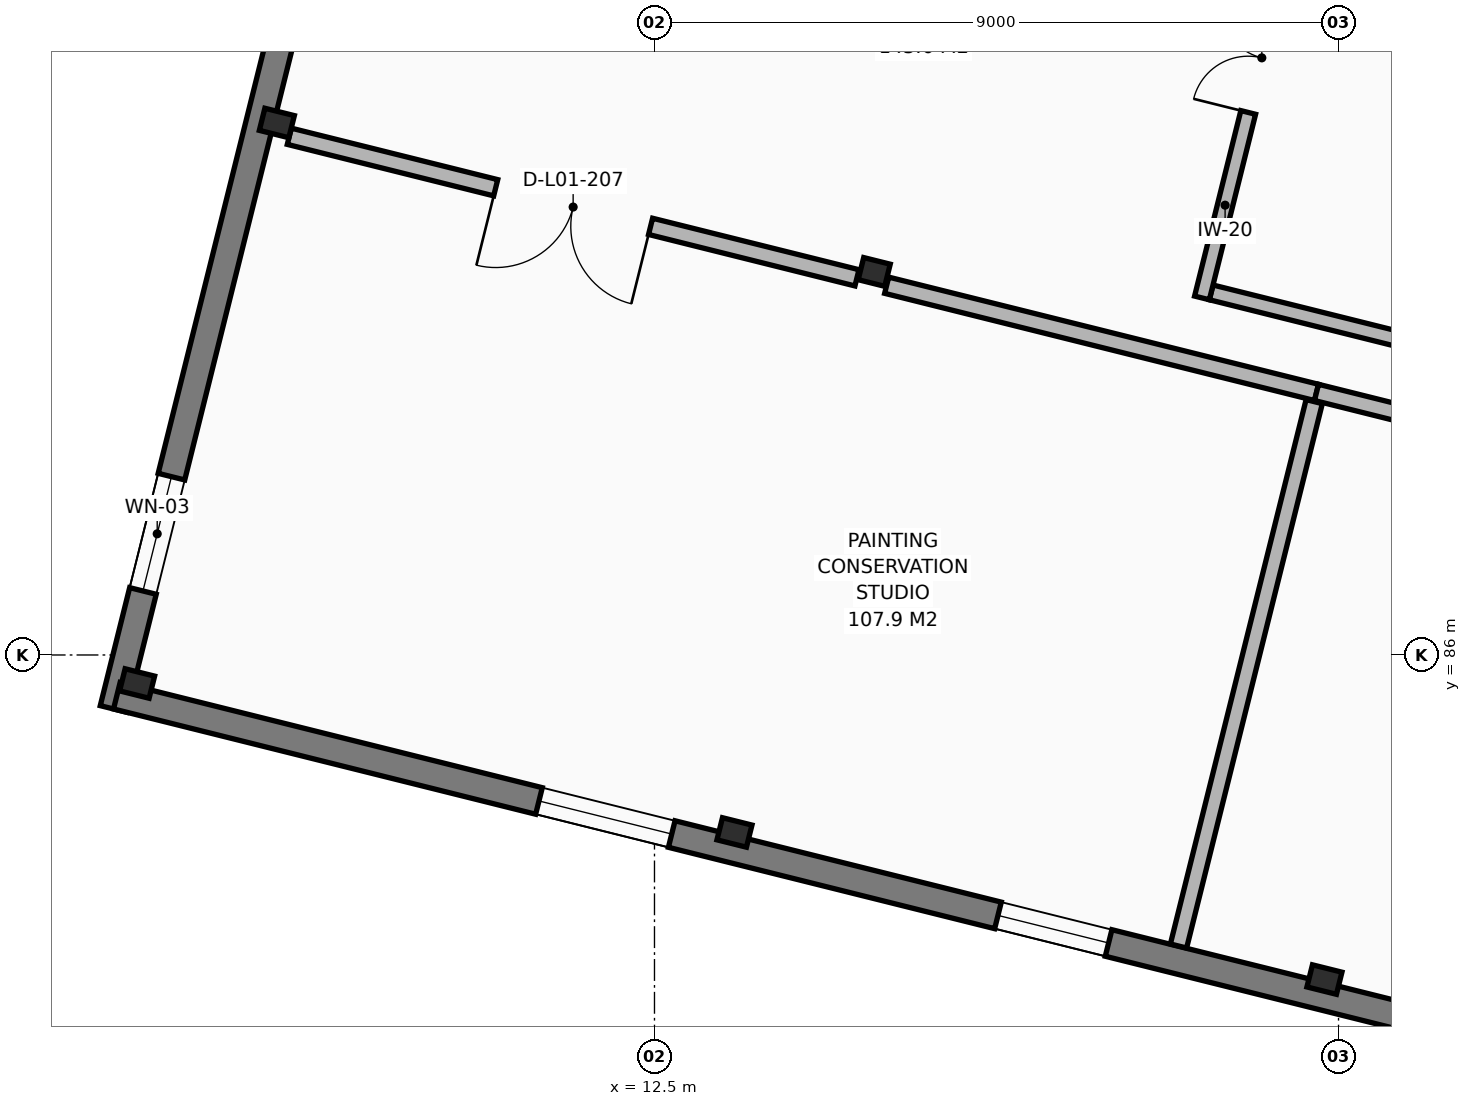
"""IFC4 building model, lengths in metres.
Left out: names, types, materials, properties, quantities, classifications, styles, units other than length and angle.
Written with IfcOpenShell. Run it as: python <this file> out.ifc"""

import sys

from ifc_helpers import new_model, si_unit, direction, frame, frame_2d, origin, origin_2d, place, context, subcontext, project, spatial, rectangle, i_section, extrude, element, fill, save


model = new_model("IFC4")
c1 = context("Model", 3, precision=1e-05, world=origin(), true_north=direction((0.0, 1.0)))
c2 = subcontext(c1, "Body", "Model", "MODEL_VIEW")
j1 = project(units=[si_unit("LENGTHUNIT", "METRE"), si_unit("PLANEANGLEUNIT", "RADIAN")], contexts=[c1])
p1 = place(None, origin())
s1 = spatial("IfcSite", under=j1, at=p1, CompositionType="ELEMENT")
p2 = place(p1, origin())
s2 = spatial("IfcBuilding", under=s1, at=p2, CompositionType="ELEMENT")
p3 = place(p2, frame((0.0, 0.0, 5.1)))
s3 = spatial("IfcBuildingStorey", under=s2, at=p3, CompositionType="ELEMENT", Elevation=5.1)
for number, where, z_axis, x_axis in (
    (1, (5.693, 85.625, 0.0), (0.0, 0.0, 1.0), (0.97, -0.242, 0.0)),
    (2, (7.531, 92.999, 0.0), (0.0, 0.0, 1.0), (0.97, -0.242, 0.0)),
    (3, (13.552, 83.665, 0.0), (0.0, 0.0, 1.0), (0.97, -0.242, 0.0)),
):
    element("IfcColumn", number, at=place(p3, frame(where, z_axis=z_axis, x_axis=x_axis)), inside=s3, PredefinedType="COLUMN", context=c2, shape_type="SweptSolid", body=[
        extrude(i_section(OverallWidth=0.3, OverallDepth=0.4, WebThickness=0.013, FlangeThickness=0.024, FilletRadius=0.027, at=origin_2d()), origin(), (0.0, 0.0, 1.0), 4.42),
    ])
p4 = place(p3, frame((15.391, 91.039, 0.0), z_axis=(0.0, 0.0, 1.0), x_axis=(0.970295726276, -0.2419218956, 0.0)))
e4 = element("IfcColumn", 4, at=p4, inside=s3, PredefinedType="COLUMN", context=c2, shape_type="SweptSolid", body=[
    extrude(i_section(OverallWidth=0.3, OverallDepth=0.36, WebThickness=0.012, FlangeThickness=0.022, FilletRadius=0.027, at=origin_2d()), origin(), (0.0, 0.0, 1.0), 4.42),
])
p5 = place(p3, frame((21.315, 81.73, 0.0), z_axis=(0.0, 0.0, 1.0), x_axis=(0.970295726276, -0.2419218956, 0.0)))
e5 = element("IfcColumn", 5, at=p5, inside=s3, PredefinedType="COLUMN", context=c2, shape_type="SweptSolid", body=[
    extrude(i_section(OverallWidth=0.3, OverallDepth=0.4, WebThickness=0.013, FlangeThickness=0.024, FilletRadius=0.027, at=origin_2d()), origin(), (0.0, 0.0, 1.0), 4.42),
])
p6 = place(p3, frame((5.383, 85.29, 0.0), z_axis=(0.0, 0.0, 1.0), x_axis=(0.241916316577, 0.970297117266, 0.0)))
e6 = element("IfcWall", 6, at=p6, inside=s3, PredefinedType="SOLIDWALL", context=c2, shape_type="SweptSolid", body=[
    extrude(rectangle(XDim=22.82, YDim=0.36, at=frame_2d((11.41, 0.0))), origin(), (0.0, 0.0, 1.0), 4.18),
])
p7 = place(p6, frame((1.6, 0.0, 0.85)))
e7 = element("IfcOpeningElement", 7, at=p7, cuts=e6, PredefinedType="OPENING", context=c2, shape_type="SweptSolid", body=[
    extrude(rectangle(XDim=1.55, YDim=1.5, at=frame_2d((0.775, 0.75))), frame((0.0, 0.19, 0.0), z_axis=(0.0, -1.0, 0.0), x_axis=(1.0, 0.0, 0.0)), (0.0, 0.0, 1.0), 0.38),
])
p8 = place(p3, frame((37.271, 77.525, 0.0), z_axis=(0.0, 0.0, 1.0), x_axis=(-0.970297203556, 0.241915970475, 0.0)))
e8 = element("IfcWall", 8, at=p8, inside=s3, PredefinedType="SOLIDWALL", context=c2, shape_type="SweptSolid", body=[
    extrude(rectangle(XDim=32.82, YDim=0.36, at=frame_2d((16.41, 0.0))), origin(), (0.0, 0.0, 1.0), 4.18),
])
p9 = place(p8, frame((1.6, 0.0, 0.85)))
e9 = element("IfcOpeningElement", 9, at=p9, cuts=e8, PredefinedType="OPENING", context=c2, shape_type="SweptSolid", body=[
    extrude(rectangle(XDim=1.8, YDim=1.7, at=frame_2d((0.9, 0.85))), frame((0.0, 0.19, 0.0), z_axis=(0.0, -1.0, 0.0), x_axis=(1.0, 0.0, 0.0)), (0.0, 0.0, 1.0), 0.38),
])
p10 = place(p8, frame((13.448, 0.0, 0.85)))
e10 = element("IfcOpeningElement", 10, at=p10, cuts=e8, PredefinedType="OPENING", context=c2, shape_type="SweptSolid", body=[
    extrude(rectangle(XDim=1.95, YDim=1.5, at=frame_2d((0.975, 0.75))), frame((0.0, 0.19, 0.0), z_axis=(0.0, -1.0, 0.0), x_axis=(1.0, 0.0, 0.0)), (0.0, 0.0, 1.0), 0.38),
])
p11 = place(p8, frame((19.372, 0.0, 0.85)))
e11 = element("IfcOpeningElement", 11, at=p11, cuts=e8, PredefinedType="OPENING", context=c2, shape_type="SweptSolid", body=[
    extrude(rectangle(XDim=1.5, YDim=1.7, at=frame_2d((0.75, 0.85))), frame((0.0, 0.19, 0.0), z_axis=(0.0, -1.0, 0.0), x_axis=(1.0, 0.0, 0.0)), (0.0, 0.0, 1.0), 0.38),
])
p12 = place(p8, frame((25.296, 0.0, 0.85)))
e12 = element("IfcOpeningElement", 12, at=p12, cuts=e8, PredefinedType="OPENING", context=c2, shape_type="SweptSolid", body=[
    extrude(rectangle(XDim=1.8, YDim=1.7, at=frame_2d((0.9, 0.85))), frame((0.0, 0.19, 0.0), z_axis=(0.0, -1.0, 0.0), x_axis=(1.0, 0.0, 0.0)), (0.0, 0.0, 1.0), 0.38),
])
p13 = place(p3, frame((19.824, 90.77, 0.0), z_axis=(0.0, 0.0, 1.0), x_axis=(0.970306396763, -0.241879094592, 0.0)))
e13 = element("IfcWall", 13, at=p13, inside=s3, PredefinedType="PARTITIONING", context=c2, shape_type="SweptSolid", body=[
    extrude(rectangle(XDim=3.15, YDim=0.2, at=frame_2d((1.575, 0.0))), origin(), (0.0, 0.0, 1.0), 4.18),
])
p14 = place(p3, frame((19.703, 90.698, 0.0), z_axis=(0.0, 0.0, 1.0), x_axis=(0.24192671796, 0.970294523914, 0.0)))
e14 = element("IfcWall", 14, at=p14, inside=s3, PredefinedType="PARTITIONING", context=c2, shape_type="SweptSolid", body=[
    extrude(rectangle(XDim=6.51, YDim=0.2, at=frame_2d((3.255, 0.0))), origin(), (0.0, 0.0, 1.0), 3.67),
])
p15 = place(p14, frame((2.515, 0.0, 0.0)))
e15 = element("IfcOpeningElement", 15, at=p15, cuts=e14, PredefinedType="OPENING", context=c2, shape_type="SweptSolid", body=[
    extrude(rectangle(XDim=1.48, YDim=2.15, at=frame_2d((0.74, 1.075))), frame((0.0, 0.11, 0.0), z_axis=(0.0, -1.0, 0.0), x_axis=(1.0, 0.0, 0.0)), (0.0, 0.0, 1.0), 0.22),
])
p16 = place(p3, frame((15.164, 90.962, 0.0), z_axis=(0.0, 0.0, 1.0), x_axis=(-0.970289717068, 0.24194599594, 0.0)))
e16 = element("IfcWall", 16, at=p16, inside=s3, PredefinedType="PARTITIONING", context=c2, shape_type="SweptSolid", body=[
    extrude(rectangle(XDim=7.697, YDim=0.22, at=frame_2d((3.849, 0.0))), origin(), (0.0, 0.0, 1.0), 3.67),
])
p17 = place(p16, frame((2.799, 0.0, 0.0)))
e17 = element("IfcOpeningElement", 17, at=p17, cuts=e16, PredefinedType="OPENING", context=c2, shape_type="SweptSolid", body=[
    extrude(rectangle(XDim=2.1, YDim=2.25, at=frame_2d((1.05, 1.125))), frame((0.0, 0.12, 0.0), z_axis=(0.0, -1.0, 0.0), x_axis=(1.0, 0.0, 0.0)), (0.0, 0.0, 1.0), 0.24),
])
p18 = place(p3, frame((21.21, 89.454, 0.0), z_axis=(0.0, 0.0, 1.0), x_axis=(-0.970292611223, 0.241934389053, 0.0)))
e18 = element("IfcWall", 18, at=p18, inside=s3, PredefinedType="PARTITIONING", context=c2, shape_type="SweptSolid", body=[
    extrude(rectangle(XDim=5.829, YDim=0.22, at=frame_2d((2.914, 0.0))), origin(), (0.0, 0.0, 1.0), 3.67),
])
p19 = place(p3, frame((22.927, 89.027, 0.0), z_axis=(0.0, 0.0, 1.0), x_axis=(-0.970312785561, 0.241853464263, 0.0)))
e19 = element("IfcWall", 19, at=p19, inside=s3, PredefinedType="PARTITIONING", context=c2, shape_type="SweptSolid", body=[
    extrude(rectangle(XDim=1.769, YDim=0.22, at=frame_2d((0.884, 0.0))), origin(), (0.0, 0.0, 1.0), 3.67),
])
p20 = place(p3, frame((21.18, 89.333, 0.0), z_axis=(0.0, 0.0, 1.0), x_axis=(-0.241928508958, -0.970294077357, 0.0)))
e20 = element("IfcWall", 20, at=p20, inside=s3, PredefinedType="PARTITIONING", context=c2, shape_type="SweptSolid", body=[
    extrude(rectangle(XDim=7.381, YDim=0.22, at=frame_2d((3.69, 0.0))), origin(), (0.0, 0.0, 1.0), 3.67),
])
p21 = place(p7, origin())
e21 = element("IfcWindow", 21, at=p21, inside=s3, PartitioningType="SINGLE_PANEL", PredefinedType="WINDOW", context=c2, shape_type="SweptSolid", body=[
    extrude(rectangle(XDim=1.55, YDim=1.5, at=frame_2d((0.775, 0.75))), frame((0.0, 0.03, 0.0), z_axis=(0.0, -1.0, 0.0), x_axis=(1.0, 0.0, 0.0)), (0.0, 0.0, 1.0), 0.06),
])
fill(e7, e21)
p22 = place(p11, origin())
e22 = element("IfcWindow", 22, at=p22, inside=s3, PartitioningType="SINGLE_PANEL", PredefinedType="WINDOW", context=c2, shape_type="SweptSolid", body=[
    extrude(rectangle(XDim=1.5, YDim=1.7, at=frame_2d((0.75, 0.85))), frame((0.0, 0.03, 0.0), z_axis=(0.0, -1.0, 0.0), x_axis=(1.0, 0.0, 0.0)), (0.0, 0.0, 1.0), 0.06),
])
fill(e11, e22)
p23 = place(p12, origin())
e23 = element("IfcWindow", 23, at=p23, inside=s3, PartitioningType="SINGLE_PANEL", PredefinedType="WINDOW", context=c2, shape_type="SweptSolid", body=[
    extrude(rectangle(XDim=1.8, YDim=1.7, at=frame_2d((0.9, 0.85))), frame((0.0, 0.03, 0.0), z_axis=(0.0, -1.0, 0.0), x_axis=(1.0, 0.0, 0.0)), (0.0, 0.0, 1.0), 0.06),
])
fill(e12, e23)
p24 = place(p15, origin())
e24 = element("IfcDoor", 24, at=p24, inside=s3, OperationType="DOUBLE_DOOR_SINGLE_SWING", PredefinedType="DOOR", context=c2, shape_type="SweptSolid", body=[
    extrude(rectangle(XDim=1.48, YDim=2.15, at=frame_2d((0.74, 1.075))), frame((0.0, 0.025, 0.0), z_axis=(0.0, -1.0, 0.0), x_axis=(1.0, 0.0, 0.0)), (0.0, 0.0, 1.0), 0.05),
])
fill(e15, e24)
p25 = place(p17, origin())
e25 = element("IfcDoor", 25, at=p25, inside=s3, OperationType="DOUBLE_DOOR_SINGLE_SWING", PredefinedType="DOOR", context=c2, shape_type="SweptSolid", body=[
    extrude(rectangle(XDim=2.1, YDim=2.25, at=frame_2d((1.05, 1.125))), frame((0.0, 0.025, 0.0), z_axis=(0.0, -1.0, 0.0), x_axis=(1.0, 0.0, 0.0)), (0.0, 0.0, 1.0), 0.05),
])
fill(e17, e25)
save(model, sys.argv[1])
